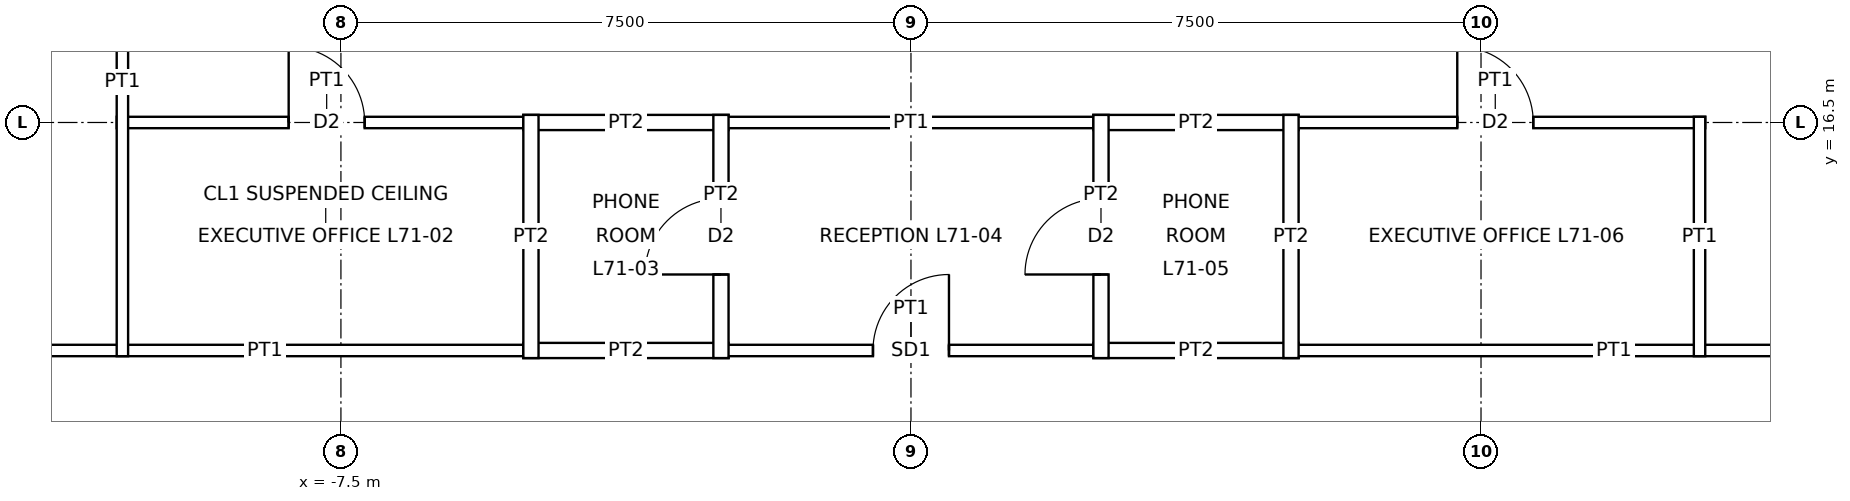
"""IFC4 building model, lengths in metres.
Left out: names, types, materials, properties, quantities, classifications, styles, units other than length and angle.
Written with IfcOpenShell. Run it as: python <this file> out.ifc"""

import sys

from ifc_helpers import new_model, si_unit, direction, frame, frame_2d, origin, place, context, subcontext, project, spatial, rectangle, extrude, element, fill, save


model = new_model("IFC4")
c1 = context("Model", 3, precision=1e-05, world=origin(), true_north=direction((0.0, 1.0)))
c2 = subcontext(c1, "Body", "Model", "MODEL_VIEW")
j1 = project(units=[si_unit("LENGTHUNIT", "METRE"), si_unit("PLANEANGLEUNIT", "RADIAN")], contexts=[c1])
p1 = place(None, origin())
s1 = spatial("IfcSite", under=j1, at=p1, CompositionType="ELEMENT")
p2 = place(p1, origin())
s2 = spatial("IfcBuilding", under=s1, at=p2, CompositionType="ELEMENT")
p3 = place(p2, frame((0.0, 0.0, 319.9)))
s3 = spatial("IfcBuildingStorey", under=s2, at=p3, CompositionType="ELEMENT", Elevation=319.9)
p4 = place(p3, frame((-12.075, 13.5, 0.0), z_axis=(0.0, 0.0, 1.0), x_axis=(1.0, 0.0, 0.0)))
e1 = element("IfcWall", 1, at=p4, inside=s3, PredefinedType="PARTITIONING", context=c2, shape_type="SweptSolid", body=[
    extrude(rectangle(XDim=7.15, YDim=0.15, at=frame_2d((3.575, 0.0))), origin(), (0.0, 0.0, 1.0), 3.85),
])
p5 = place(p3, frame((-5.1, 13.5, 0.0), z_axis=(0.0, 0.0, 1.0), x_axis=(1.0, 0.0, 0.0)))
e2 = element("IfcWall", 2, at=p5, inside=s3, PredefinedType="PARTITIONING", context=c2, shape_type="SweptSolid", body=[
    extrude(rectangle(XDim=2.7, YDim=0.2, at=frame_2d((1.35, 0.0))), origin(), (0.0, 0.0, 1.0), 3.85),
])
p6 = place(p3, frame((-2.575, 13.5, 0.0), z_axis=(0.0, 0.0, 1.0), x_axis=(1.0, 0.0, 0.0)))
e3 = element("IfcWall", 3, at=p6, inside=s3, PredefinedType="PARTITIONING", context=c2, shape_type="SweptSolid", body=[
    extrude(rectangle(XDim=5.15, YDim=0.15, at=frame_2d((2.575, 0.0))), origin(), (0.0, 0.0, 1.0), 3.85),
])
p7 = place(p6, frame((2.075, 0.0, 0.0)))
e4 = element("IfcOpeningElement", 4, at=p7, cuts=e3, PredefinedType="OPENING", context=c2, shape_type="SweptSolid", body=[
    extrude(rectangle(XDim=1.0, YDim=2.4, at=frame_2d((0.5, 1.2))), frame((0.0, 0.085, 0.0), z_axis=(0.0, -1.0, 0.0), x_axis=(1.0, 0.0, 0.0)), (0.0, 0.0, 1.0), 0.17),
])
p8 = place(p3, frame((2.4, 13.5, 0.0), z_axis=(0.0, 0.0, 1.0), x_axis=(1.0, 0.0, 0.0)))
e5 = element("IfcWall", 5, at=p8, inside=s3, PredefinedType="PARTITIONING", context=c2, shape_type="SweptSolid", body=[
    extrude(rectangle(XDim=2.7, YDim=0.2, at=frame_2d((1.35, 0.0))), origin(), (0.0, 0.0, 1.0), 3.85),
])
p9 = place(p3, frame((4.925, 13.5, 0.0), z_axis=(0.0, 0.0, 1.0), x_axis=(1.0, 0.0, 0.0)))
e6 = element("IfcWall", 6, at=p9, inside=s3, PredefinedType="PARTITIONING", context=c2, shape_type="SweptSolid", body=[
    extrude(rectangle(XDim=8.65, YDim=0.15, at=frame_2d((4.325, 0.0))), origin(), (0.0, 0.0, 1.0), 3.85),
])
p10 = place(p3, frame((-10.45, 16.5, 0.0), z_axis=(0.0, 0.0, 1.0), x_axis=(1.0, 0.0, 0.0)))
e7 = element("IfcWall", 7, at=p10, inside=s3, PredefinedType="PARTITIONING", context=c2, shape_type="SweptSolid", body=[
    extrude(rectangle(XDim=5.525, YDim=0.15, at=frame_2d((2.762, 0.0))), origin(), (0.0, 0.0, 1.0), 3.85),
])
p11 = place(p10, frame((2.262, 0.0, 0.0)))
e8 = element("IfcOpeningElement", 8, at=p11, cuts=e7, PredefinedType="OPENING", context=c2, shape_type="SweptSolid", body=[
    extrude(rectangle(XDim=1.0, YDim=2.1, at=frame_2d((0.5, 1.05))), frame((0.0, 0.085, 0.0), z_axis=(0.0, -1.0, 0.0), x_axis=(1.0, 0.0, 0.0)), (0.0, 0.0, 1.0), 0.17),
])
p12 = place(p3, frame((-5.1, 16.5, 0.0), z_axis=(0.0, 0.0, 1.0), x_axis=(1.0, 0.0, 0.0)))
e9 = element("IfcWall", 9, at=p12, inside=s3, PredefinedType="PARTITIONING", context=c2, shape_type="SweptSolid", body=[
    extrude(rectangle(XDim=2.7, YDim=0.2, at=frame_2d((1.35, 0.0))), origin(), (0.0, 0.0, 1.0), 3.85),
])
p13 = place(p3, frame((-2.575, 16.5, 0.0), z_axis=(0.0, 0.0, 1.0), x_axis=(1.0, 0.0, 0.0)))
e10 = element("IfcWall", 10, at=p13, inside=s3, PredefinedType="PARTITIONING", context=c2, shape_type="SweptSolid", body=[
    extrude(rectangle(XDim=5.15, YDim=0.15, at=frame_2d((2.575, 0.0))), origin(), (0.0, 0.0, 1.0), 3.85),
])
p14 = place(p3, frame((2.4, 16.5, 0.0), z_axis=(0.0, 0.0, 1.0), x_axis=(1.0, 0.0, 0.0)))
e11 = element("IfcWall", 11, at=p14, inside=s3, PredefinedType="PARTITIONING", context=c2, shape_type="SweptSolid", body=[
    extrude(rectangle(XDim=2.7, YDim=0.2, at=frame_2d((1.35, 0.0))), origin(), (0.0, 0.0, 1.0), 3.85),
])
p15 = place(p3, frame((4.925, 16.5, 0.0), z_axis=(0.0, 0.0, 1.0), x_axis=(1.0, 0.0, 0.0)))
e12 = element("IfcWall", 12, at=p15, inside=s3, PredefinedType="PARTITIONING", context=c2, shape_type="SweptSolid", body=[
    extrude(rectangle(XDim=5.525, YDim=0.15, at=frame_2d((2.762, 0.0))), origin(), (0.0, 0.0, 1.0), 3.85),
])
p16 = place(p15, frame((2.262, 0.0, 0.0)))
e13 = element("IfcOpeningElement", 13, at=p16, cuts=e12, PredefinedType="OPENING", context=c2, shape_type="SweptSolid", body=[
    extrude(rectangle(XDim=1.0, YDim=2.1, at=frame_2d((0.5, 1.05))), frame((0.0, 0.085, 0.0), z_axis=(0.0, -1.0, 0.0), x_axis=(1.0, 0.0, 0.0)), (0.0, 0.0, 1.0), 0.17),
])
p17 = place(p3, frame((-10.375, 13.425, 0.0), z_axis=(0.0, 0.0, 1.0), x_axis=(0.0, 1.0, 0.0)))
e14 = element("IfcWall", 14, at=p17, inside=s3, PredefinedType="PARTITIONING", context=c2, shape_type="SweptSolid", body=[
    extrude(rectangle(XDim=7.225, YDim=0.15, at=frame_2d((3.612, 0.0))), origin(), (0.0, 0.0, 1.0), 3.85),
])
p18 = place(p3, frame((-5.0, 13.4, 0.0), z_axis=(0.0, 0.0, 1.0), x_axis=(0.0, 1.0, 0.0)))
e15 = element("IfcWall", 15, at=p18, inside=s3, PredefinedType="PARTITIONING", context=c2, shape_type="SweptSolid", body=[
    extrude(rectangle(XDim=3.2, YDim=0.2, at=frame_2d((1.6, 0.0))), origin(), (0.0, 0.0, 1.0), 3.85),
])
p19 = place(p3, frame((-2.5, 13.4, 0.0), z_axis=(0.0, 0.0, 1.0), x_axis=(0.0, 1.0, 0.0)))
e16 = element("IfcWall", 16, at=p19, inside=s3, PredefinedType="PARTITIONING", context=c2, shape_type="SweptSolid", body=[
    extrude(rectangle(XDim=3.2, YDim=0.2, at=frame_2d((1.6, 0.0))), origin(), (0.0, 0.0, 1.0), 3.85),
])
p20 = place(p19, frame((1.1, 0.0, 0.0)))
e17 = element("IfcOpeningElement", 17, at=p20, cuts=e16, PredefinedType="OPENING", context=c2, shape_type="SweptSolid", body=[
    extrude(rectangle(XDim=1.0, YDim=2.1, at=frame_2d((0.5, 1.05))), frame((0.0, 0.11, 0.0), z_axis=(0.0, -1.0, 0.0), x_axis=(1.0, 0.0, 0.0)), (0.0, 0.0, 1.0), 0.22),
])
p21 = place(p3, frame((2.5, 13.4, 0.0), z_axis=(0.0, 0.0, 1.0), x_axis=(0.0, 1.0, 0.0)))
e18 = element("IfcWall", 18, at=p21, inside=s3, PredefinedType="PARTITIONING", context=c2, shape_type="SweptSolid", body=[
    extrude(rectangle(XDim=3.2, YDim=0.2, at=frame_2d((1.6, 0.0))), origin(), (0.0, 0.0, 1.0), 3.85),
])
p22 = place(p21, frame((1.1, 0.0, 0.0)))
e19 = element("IfcOpeningElement", 19, at=p22, cuts=e18, PredefinedType="OPENING", context=c2, shape_type="SweptSolid", body=[
    extrude(rectangle(XDim=1.0, YDim=2.1, at=frame_2d((0.5, 1.05))), frame((0.0, 0.11, 0.0), z_axis=(0.0, -1.0, 0.0), x_axis=(1.0, 0.0, 0.0)), (0.0, 0.0, 1.0), 0.22),
])
p23 = place(p3, frame((5.0, 13.4, 0.0), z_axis=(0.0, 0.0, 1.0), x_axis=(0.0, 1.0, 0.0)))
e20 = element("IfcWall", 20, at=p23, inside=s3, PredefinedType="PARTITIONING", context=c2, shape_type="SweptSolid", body=[
    extrude(rectangle(XDim=3.2, YDim=0.2, at=frame_2d((1.6, 0.0))), origin(), (0.0, 0.0, 1.0), 3.85),
])
p24 = place(p3, frame((10.375, 13.425, 0.0), z_axis=(0.0, 0.0, 1.0), x_axis=(0.0, 1.0, 0.0)))
e21 = element("IfcWall", 21, at=p24, inside=s3, PredefinedType="PARTITIONING", context=c2, shape_type="SweptSolid", body=[
    extrude(rectangle(XDim=3.15, YDim=0.15, at=frame_2d((1.575, 0.0))), origin(), (0.0, 0.0, 1.0), 3.85),
])
p25 = place(p11, origin())
e22 = element("IfcDoor", 22, at=p25, inside=s3, OperationType="SINGLE_SWING_LEFT", PredefinedType="DOOR", context=c2, shape_type="SweptSolid", body=[
    extrude(rectangle(XDim=1.0, YDim=2.1, at=frame_2d((0.5, 1.05))), frame((0.0, 0.025, 0.0), z_axis=(0.0, -1.0, 0.0), x_axis=(1.0, 0.0, 0.0)), (0.0, 0.0, 1.0), 0.05),
])
fill(e8, e22)
p26 = place(p20, origin())
e23 = element("IfcDoor", 23, at=p26, inside=s3, OperationType="SINGLE_SWING_LEFT", PredefinedType="DOOR", context=c2, shape_type="SweptSolid", body=[
    extrude(rectangle(XDim=1.0, YDim=2.1, at=frame_2d((0.5, 1.05))), frame((0.0, 0.025, 0.0), z_axis=(0.0, -1.0, 0.0), x_axis=(1.0, 0.0, 0.0)), (0.0, 0.0, 1.0), 0.05),
])
fill(e17, e23)
p27 = place(p7, origin())
e24 = element("IfcDoor", 24, at=p27, inside=s3, OperationType="SINGLE_SWING_RIGHT", PredefinedType="DOOR", context=c2, shape_type="SweptSolid", body=[
    extrude(rectangle(XDim=1.0, YDim=2.4, at=frame_2d((0.5, 1.2))), frame((0.0, 0.025, 0.0), z_axis=(0.0, -1.0, 0.0), x_axis=(1.0, 0.0, 0.0)), (0.0, 0.0, 1.0), 0.05),
])
fill(e4, e24)
p28 = place(p22, origin())
e25 = element("IfcDoor", 25, at=p28, inside=s3, OperationType="SINGLE_SWING_LEFT", PredefinedType="DOOR", context=c2, shape_type="SweptSolid", body=[
    extrude(rectangle(XDim=1.0, YDim=2.1, at=frame_2d((0.5, 1.05))), frame((0.0, 0.025, 0.0), z_axis=(0.0, -1.0, 0.0), x_axis=(1.0, 0.0, 0.0)), (0.0, 0.0, 1.0), 0.05),
])
fill(e19, e25)
p29 = place(p16, origin())
e26 = element("IfcDoor", 26, at=p29, inside=s3, OperationType="SINGLE_SWING_LEFT", PredefinedType="DOOR", context=c2, shape_type="SweptSolid", body=[
    extrude(rectangle(XDim=1.0, YDim=2.1, at=frame_2d((0.5, 1.05))), frame((0.0, 0.025, 0.0), z_axis=(0.0, -1.0, 0.0), x_axis=(1.0, 0.0, 0.0)), (0.0, 0.0, 1.0), 0.05),
])
fill(e13, e26)
save(model, sys.argv[1])
